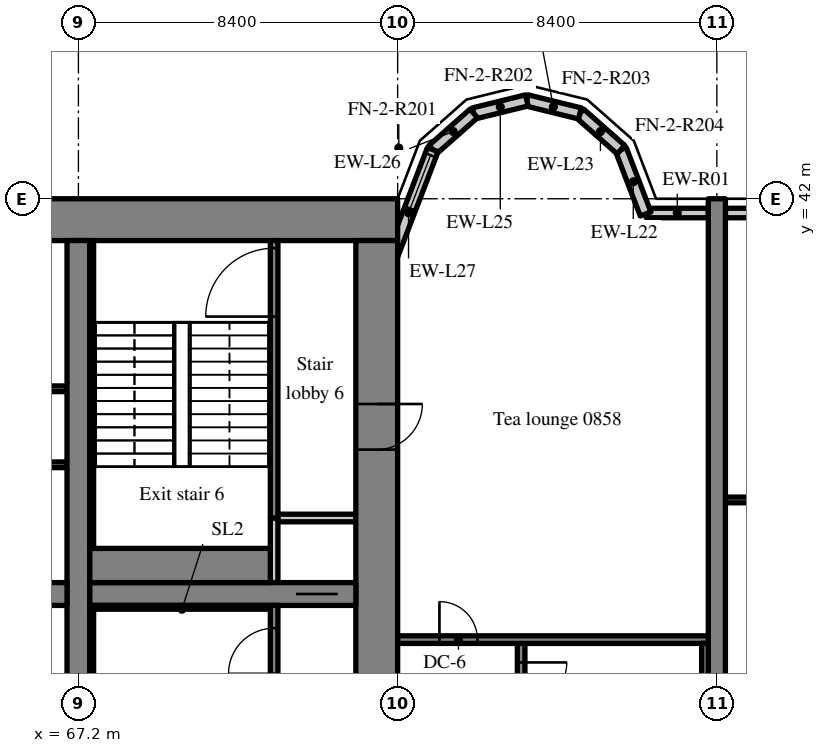
"""IFC4 building model, lengths in metres.
Left out: names, types, materials, properties, quantities, classifications, styles, units other than length and angle.
Written with IfcOpenShell. Run it as: python <this file> out.ifc"""

import sys

from ifc_helpers import new_model, si_unit, direction, frame, frame_2d, origin, place, context, subcontext, project, spatial, rectangle, extrude, source, transform, mapped, element, fill, save


model = new_model("IFC4")
c1 = context("Model", 3, precision=1e-05, world=origin(), true_north=direction((0.0, 1.0)))
c2 = subcontext(c1, "Body", "Model", "MODEL_VIEW")
j1 = project(units=[si_unit("LENGTHUNIT", "METRE"), si_unit("PLANEANGLEUNIT", "RADIAN")], contexts=[c1])
p1 = place(None, origin())
s1 = spatial("IfcSite", under=j1, at=p1, CompositionType="ELEMENT")
p2 = place(p1, origin())
s2 = spatial("IfcBuilding", under=s1, at=p2, CompositionType="ELEMENT")
p3 = place(p2, frame((0.0, 0.0, 39.2)))
s3 = spatial("IfcBuildingStorey", under=s2, at=p3, CompositionType="ELEMENT", Elevation=39.2)
m1 = source(origin(), c2, "Body", "SweptSolid", [
    extrude(rectangle(XDim=50.4, YDim=1.1, at=frame_2d((25.2, 0.0))), origin(), (0.0, 0.0, 1.0), 3.52),
])
p4 = place(p3, frame((25.2, 41.45, 0.0), z_axis=(0.0, 0.0, 1.0), x_axis=(1.0, 0.0, 0.0)))
e1 = element("IfcWall", 1, at=p4, inside=s3, PredefinedType="SHEAR", context=c2, shape_type="MappedRepresentation", body=[
    mapped(m1, transform((0.0, 0.0, 0.0), scale=1.0)),
])
m2 = source(origin(), c2, "Body", "SweptSolid", [
    extrude(rectangle(XDim=17.8, YDim=1.1, at=frame_2d((8.9, 0.0))), origin(), (0.0, 0.0, 1.0), 3.52),
])
p5 = place(p3, frame((75.05, 23.1, 0.0), z_axis=(0.0, 0.0, 1.0), x_axis=(0.0, 1.0, 0.0)))
e2 = element("IfcWall", 2, at=p5, inside=s3, PredefinedType="SHEAR", context=c2, shape_type="MappedRepresentation", body=[
    mapped(m2, transform((0.0, 0.0, 0.0), scale=1.0)),
])
m3 = source(origin(), c2, "Body", "SweptSolid", [
    extrude(rectangle(XDim=1.2, YDim=2.1, at=frame_2d((0.6, 1.05))), frame((0.0, 0.56, 0.0), z_axis=(0.0, -1.0, 0.0), x_axis=(1.0, 0.0, 0.0)), (0.0, 0.0, 1.0), 1.12),
])
p6 = place(p5, frame((12.3, 0.0, 0.0)))
e3 = element("IfcOpeningElement", 3, at=p6, cuts=e2, PredefinedType="OPENING", context=c2, shape_type="MappedRepresentation", body=[
    mapped(m3, transform((0.0, 0.0, 0.0), scale=1.0)),
])
m4 = source(origin(), c2, "Body", "SweptSolid", [
    extrude(rectangle(XDim=17.8, YDim=0.6, at=frame_2d((8.9, 0.0))), origin(), (0.0, 0.0, 1.0), 3.52),
])
p7 = place(p3, frame((67.2, 23.1, 0.0), z_axis=(0.0, 0.0, 1.0), x_axis=(0.0, 1.0, 0.0)))
e4 = element("IfcWall", 4, at=p7, inside=s3, PredefinedType="SHEAR", context=c2, shape_type="MappedRepresentation", body=[
    mapped(m4, transform((0.0, 0.0, 0.0), scale=1.0)),
])
m5 = source(origin(), c2, "Body", "SweptSolid", [
    extrude(rectangle(XDim=16.2, YDim=0.6, at=frame_2d((8.1, 0.0))), origin(), (0.0, 0.0, 1.0), 3.52),
])
p8 = place(p3, frame((50.7, 31.6, 0.0), z_axis=(0.0, 0.0, 1.0), x_axis=(1.0, 0.0, 0.0)))
e5 = element("IfcWall", 5, at=p8, inside=s3, PredefinedType="SHEAR", context=c2, shape_type="MappedRepresentation", body=[
    mapped(m5, transform((0.0, 0.0, 0.0), scale=1.0)),
])
m6 = source(origin(), c2, "Body", "SweptSolid", [
    extrude(rectangle(XDim=1.0, YDim=2.1, at=frame_2d((0.5, 1.05))), frame((0.0, 0.31, 0.0), z_axis=(0.0, -1.0, 0.0), x_axis=(1.0, 0.0, 0.0)), (0.0, 0.0, 1.0), 0.62),
])
p9 = place(p8, frame((0.55, 0.0, 0.0)))
e6 = element("IfcOpeningElement", 6, at=p9, cuts=e5, PredefinedType="OPENING", context=c2, shape_type="MappedRepresentation", body=[
    mapped(m6, transform((0.0, 0.0, 0.0), scale=1.0)),
])
m7 = source(origin(), c2, "Body", "SweptSolid", [
    extrude(rectangle(XDim=7.0, YDim=0.6, at=frame_2d((3.5, 0.0))), origin(), (0.0, 0.0, 1.0), 3.52),
])
p10 = place(p3, frame((67.5, 31.6, 0.0), z_axis=(0.0, 0.0, 1.0), x_axis=(1.0, 0.0, 0.0)))
e7 = element("IfcWall", 7, at=p10, inside=s3, PredefinedType="SHEAR", context=c2, shape_type="MappedRepresentation", body=[
    mapped(m7, transform((0.0, 0.0, 0.0), scale=1.0)),
])
m8 = source(origin(), c2, "Body", "SweptSolid", [
    extrude(rectangle(XDim=1.1, YDim=2.1, at=frame_2d((0.55, 1.05))), frame((0.0, 0.31, 0.0), z_axis=(0.0, -1.0, 0.0), x_axis=(1.0, 0.0, 0.0)), (0.0, 0.0, 1.0), 0.62),
])
p11 = place(p10, frame((5.425, 0.0, 0.0)))
e8 = element("IfcOpeningElement", 8, at=p11, cuts=e7, PredefinedType="OPENING", context=c2, shape_type="MappedRepresentation", body=[
    mapped(m8, transform((0.0, 0.0, 0.0), scale=1.0)),
])
m9 = source(origin(), c2, "Body", "SweptSolid", [
    extrude(rectangle(XDim=20.0, YDim=0.45, at=frame_2d((10.0, 0.0))), origin(), (0.0, 0.0, 1.0), 3.52),
])
p12 = place(p3, frame((84.0, 22.0, 0.0), z_axis=(0.0, 0.0, 1.0), x_axis=(0.0, 1.0, 0.0)))
e9 = element("IfcWall", 9, at=p12, inside=s3, PredefinedType="SHEAR", context=c2, shape_type="MappedRepresentation", body=[
    mapped(m9, transform((0.0, 0.0, 0.0), scale=1.0)),
])
m10 = source(origin(), c2, "Body", "SweptSolid", [
    extrude(rectangle(XDim=1.633, YDim=0.25, at=frame_2d((0.816, 0.0))), origin(), (0.0, 0.0, 1.0), 2.77),
])
p13 = place(p3, frame((83.775, 41.625, 0.0), z_axis=(0.0, 0.0, 1.0), x_axis=(-1.0, 0.0, 0.0)))
e10 = element("IfcWall", 10, at=p13, inside=s3, PredefinedType="SOLIDWALL", context=c2, shape_type="MappedRepresentation", body=[
    mapped(m10, transform((0.0, 0.0, 0.0), scale=1.0)),
])
m11 = source(origin(), c2, "Body", "SweptSolid", [
    extrude(rectangle(XDim=3.525, YDim=0.25, at=frame_2d((1.762, 0.0))), origin(), (0.0, 0.0, 1.0), 2.77),
])
p14 = place(p3, frame((87.75, 41.625, 0.0), z_axis=(0.0, 0.0, 1.0), x_axis=(-1.0, 0.0, 0.0)))
e11 = element("IfcWall", 11, at=p14, inside=s3, PredefinedType="SOLIDWALL", context=c2, shape_type="MappedRepresentation", body=[
    mapped(m11, transform((0.0, 0.0, 0.0), scale=1.0)),
])
m12 = source(origin(), c2, "Body", "SweptSolid", [
    extrude(rectangle(XDim=1.5, YDim=1.5, at=frame_2d((0.75, 0.75))), frame((0.0, 0.135, 0.0), z_axis=(0.0, -1.0, 0.0), x_axis=(1.0, 0.0, 0.0)), (0.0, 0.0, 1.0), 0.27),
])
p15 = place(p14, frame((1.012, 0.0, 0.9)))
e12 = element("IfcOpeningElement", 12, at=p15, cuts=e11, PredefinedType="OPENING", context=c2, shape_type="MappedRepresentation", body=[
    mapped(m12, transform((0.0, 0.0, 0.0), scale=1.0)),
])
m13 = source(origin(), c2, "Body", "SweptSolid", [
    extrude(rectangle(XDim=1.812, YDim=0.3, at=frame_2d((0.906, 0.0))), origin(), (0.0, 0.0, 1.0), 3.52),
])
p16 = place(p3, frame((82.125, 41.6, 0.0), z_axis=(0.0, 0.0, 1.0), x_axis=(-0.357877270961, 0.93376863244, 0.0)))
e13 = element("IfcWall", 13, at=p16, inside=s3, PredefinedType="SOLIDWALL", context=c2, shape_type="MappedRepresentation", body=[
    mapped(m13, transform((0.0, 0.0, 0.0), scale=1.0)),
])
m14 = source(origin(), c2, "Body", "SweptSolid", [
    extrude(rectangle(XDim=1.44, YDim=0.3, at=frame_2d((0.72, 0.0))), origin(), (0.0, 0.0, 1.0), 3.52),
])
p17 = place(p3, frame((81.477, 43.292, 0.0), z_axis=(0.0, 0.0, 1.0), x_axis=(-0.74957555648, 0.661918790432, 0.0)))
e14 = element("IfcWall", 14, at=p17, inside=s3, PredefinedType="SOLIDWALL", context=c2, shape_type="MappedRepresentation", body=[
    mapped(m14, transform((0.0, 0.0, 0.0), scale=1.0)),
])
m15 = source(origin(), c2, "Body", "SweptSolid", [
    extrude(rectangle(XDim=1.439, YDim=0.3, at=frame_2d((0.719, 0.0))), origin(), (0.0, 0.0, 1.0), 3.52),
])
for number, where, z_axis, x_axis in (
    (15, (80.397, 44.245, 0.0), (0.0, 0.0, 1.0), (-0.971, 0.238, 0.0)),
    (16, (79.0, 44.588, 0.0), (0.0, 0.0, 1.0), (-0.971, -0.238, 0.0)),
):
    element("IfcWall", number, at=place(p3, frame(where, z_axis=z_axis, x_axis=x_axis)), inside=s3, PredefinedType="SOLIDWALL", context=c2, shape_type="MappedRepresentation", body=[
        mapped(m15, transform((0.0, 0.0, 0.0), scale=1.0)),
    ])
p18 = place(p3, frame((77.603, 44.245, 0.0), z_axis=(0.0, 0.0, 1.0), x_axis=(-0.74957555648, -0.661918790432, 0.0)))
e17 = element("IfcWall", 17, at=p18, inside=s3, PredefinedType="SOLIDWALL", context=c2, shape_type="MappedRepresentation", body=[
    mapped(m14, transform((0.0, 0.0, 0.0), scale=1.0)),
])
m16 = source(origin(), c2, "Body", "SweptSolid", [
    extrude(rectangle(XDim=3.559, YDim=0.3, at=frame_2d((1.78, 0.0))), origin(), (0.0, 0.0, 1.0), 3.52),
])
p19 = place(p3, frame((76.523, 43.292, 0.0), z_axis=(0.0, 0.0, 1.0), x_axis=(-0.35779745313, -0.933799219604, 0.0)))
e18 = element("IfcWall", 18, at=p19, inside=s3, PredefinedType="SOLIDWALL", context=c2, shape_type="MappedRepresentation", body=[
    mapped(m16, transform((0.0, 0.0, 0.0), scale=1.0)),
])
m17 = source(origin(), c2, "Body", "SweptSolid", [
    extrude(rectangle(XDim=1.5, YDim=2.0, at=frame_2d((0.75, 1.0))), frame((0.0, 0.16, 0.0), z_axis=(0.0, -1.0, 0.0), x_axis=(1.0, 0.0, 0.0)), (0.0, 0.0, 1.0), 0.32),
])
p20 = place(p19, frame((0.156, 0.0, 0.9)))
e19 = element("IfcOpeningElement", 19, at=p20, cuts=e18, PredefinedType="OPENING", context=c2, shape_type="MappedRepresentation", body=[
    mapped(m17, transform((0.0, 0.0, 0.0), scale=1.0)),
])
m18 = source(origin(), c2, "Body", "SweptSolid", [
    extrude(rectangle(XDim=14.1, YDim=0.15, at=frame_2d((7.05, 0.0))), origin(), (0.0, 0.0, 1.0), 3.52),
])
p21 = place(p3, frame((66.9, 35.0, 0.0), z_axis=(0.0, 0.0, 1.0), x_axis=(-1.0, 0.0, 0.0)))
e20 = element("IfcWall", 20, at=p21, inside=s3, PredefinedType="PARTITIONING", context=c2, shape_type="MappedRepresentation", body=[
    mapped(m18, transform((0.0, 0.0, 0.0), scale=1.0)),
])
m19 = source(origin(), c2, "Body", "SweptSolid", [
    extrude(rectangle(XDim=0.9, YDim=2.1, at=frame_2d((0.45, 1.05))), frame((0.0, 0.085, 0.0), z_axis=(0.0, -1.0, 0.0), x_axis=(1.0, 0.0, 0.0)), (0.0, 0.0, 1.0), 0.17),
])
p22 = place(p21, frame((2.004, 0.0, 0.0)))
e21 = element("IfcOpeningElement", 21, at=p22, cuts=e20, PredefinedType="OPENING", context=c2, shape_type="MappedRepresentation", body=[
    mapped(m19, transform((0.0, 0.0, 0.0), scale=1.0)),
])
p23 = place(p21, frame((9.017, 0.0, 0.0)))
e22 = element("IfcOpeningElement", 22, at=p23, cuts=e20, PredefinedType="OPENING", context=c2, shape_type="MappedRepresentation", body=[
    mapped(m19, transform((0.0, 0.0, 0.0), scale=1.0)),
])
m20 = source(origin(), c2, "Body", "SweptSolid", [
    extrude(rectangle(XDim=16.2, YDim=0.15, at=frame_2d((8.1, 0.0))), origin(), (0.0, 0.0, 1.0), 3.52),
])
p24 = place(p3, frame((66.9, 37.0, 0.0), z_axis=(0.0, 0.0, 1.0), x_axis=(-1.0, 0.0, 0.0)))
e23 = element("IfcWall", 23, at=p24, inside=s3, PredefinedType="PARTITIONING", context=c2, shape_type="MappedRepresentation", body=[
    mapped(m20, transform((0.0, 0.0, 0.0), scale=1.0)),
])
p25 = place(p24, frame((1.575, 0.0, 0.0)))
e24 = element("IfcOpeningElement", 24, at=p25, cuts=e23, PredefinedType="OPENING", context=c2, shape_type="MappedRepresentation", body=[
    mapped(m19, transform((0.0, 0.0, 0.0), scale=1.0)),
])
p26 = place(p24, frame((7.245, 0.0, 0.0)))
e25 = element("IfcOpeningElement", 25, at=p26, cuts=e23, PredefinedType="OPENING", context=c2, shape_type="MappedRepresentation", body=[
    mapped(m19, transform((0.0, 0.0, 0.0), scale=1.0)),
])
p27 = place(p24, frame((12.105, 0.0, 0.0)))
e26 = element("IfcOpeningElement", 26, at=p27, cuts=e23, PredefinedType="OPENING", context=c2, shape_type="MappedRepresentation", body=[
    mapped(m19, transform((0.0, 0.0, 0.0), scale=1.0)),
])
p28 = place(p24, frame((14.535, 0.0, 0.0)))
e27 = element("IfcOpeningElement", 27, at=p28, cuts=e23, PredefinedType="OPENING", context=c2, shape_type="MappedRepresentation", body=[
    mapped(m19, transform((0.0, 0.0, 0.0), scale=1.0)),
])
m21 = source(origin(), c2, "Body", "SweptSolid", [
    extrude(rectangle(XDim=8.2, YDim=0.2, at=frame_2d((4.1, 0.0))), origin(), (0.0, 0.0, 1.0), 3.52),
])
p29 = place(p3, frame((72.35, 23.1, 0.0), z_axis=(0.0, 0.0, 1.0), x_axis=(0.0, 1.0, 0.0)))
e28 = element("IfcWall", 28, at=p29, inside=s3, PredefinedType="SOLIDWALL", context=c2, shape_type="MappedRepresentation", body=[
    mapped(m21, transform((0.0, 0.0, 0.0), scale=1.0)),
])
m22 = source(origin(), c2, "Body", "SweptSolid", [
    extrude(rectangle(XDim=1.2, YDim=2.1, at=frame_2d((0.6, 1.05))), frame((0.0, 0.11, 0.0), z_axis=(0.0, -1.0, 0.0), x_axis=(1.0, 0.0, 0.0)), (0.0, 0.0, 1.0), 0.22),
])
p30 = place(p29, frame((6.4, 0.0, 0.0)))
e29 = element("IfcOpeningElement", 29, at=p30, cuts=e28, PredefinedType="OPENING", context=c2, shape_type="MappedRepresentation", body=[
    mapped(m22, transform((0.0, 0.0, 0.0), scale=1.0)),
])
m23 = source(origin(), c2, "Body", "SweptSolid", [
    extrude(rectangle(XDim=1.7, YDim=0.2, at=frame_2d((0.85, 0.0))), origin(), (0.0, 0.0, 1.0), 3.52),
])
p31 = place(p3, frame((72.35, 31.9, 0.0), z_axis=(0.0, 0.0, 1.0), x_axis=(0.0, 1.0, 0.0)))
e30 = element("IfcWall", 30, at=p31, inside=s3, PredefinedType="SOLIDWALL", context=c2, shape_type="MappedRepresentation", body=[
    mapped(m23, transform((0.0, 0.0, 0.0), scale=1.0)),
])
m24 = source(origin(), c2, "Body", "SweptSolid", [
    extrude(rectangle(XDim=2.05, YDim=0.2, at=frame_2d((1.025, 0.0))), origin(), (0.0, 0.0, 1.0), 3.52),
])
p32 = place(p3, frame((72.45, 33.6, 0.0), z_axis=(0.0, 0.0, 1.0), x_axis=(1.0, 0.0, 0.0)))
e31 = element("IfcWall", 31, at=p32, inside=s3, PredefinedType="SOLIDWALL", context=c2, shape_type="MappedRepresentation", body=[
    mapped(m24, transform((0.0, 0.0, 0.0), scale=1.0)),
])
m25 = source(origin(), c2, "Body", "SweptSolid", [
    extrude(rectangle(XDim=7.3, YDim=0.2, at=frame_2d((3.65, 0.0))), origin(), (0.0, 0.0, 1.0), 3.52),
])
p33 = place(p3, frame((72.35, 33.6, 0.0), z_axis=(0.0, 0.0, 1.0), x_axis=(0.0, 1.0, 0.0)))
e32 = element("IfcWall", 32, at=p33, inside=s3, PredefinedType="SOLIDWALL", context=c2, shape_type="MappedRepresentation", body=[
    mapped(m25, transform((0.0, 0.0, 0.0), scale=1.0)),
])
m26 = source(origin(), c2, "Body", "SweptSolid", [
    extrude(rectangle(XDim=1.8, YDim=2.1, at=frame_2d((0.9, 1.05))), frame((0.0, 0.11, 0.0), z_axis=(0.0, -1.0, 0.0), x_axis=(1.0, 0.0, 0.0)), (0.0, 0.0, 1.0), 0.22),
])
p34 = place(p33, frame((5.3, 0.0, 0.0)))
e33 = element("IfcOpeningElement", 33, at=p34, cuts=e32, PredefinedType="OPENING", context=c2, shape_type="MappedRepresentation", body=[
    mapped(m26, transform((0.0, 0.0, 0.0), scale=1.0)),
])
m27 = source(origin(), c2, "Body", "SweptSolid", [
    extrude(rectangle(XDim=8.3, YDim=0.2, at=frame_2d((4.15, 0.0))), origin(), (0.0, 0.0, 1.0), 3.52),
])
p35 = place(p3, frame((78.85, 22.1, 0.0), z_axis=(0.0, 0.0, 1.0), x_axis=(0.0, 1.0, 0.0)))
e34 = element("IfcWall", 34, at=p35, inside=s3, PredefinedType="SOLIDWALL", context=c2, shape_type="MappedRepresentation", body=[
    mapped(m27, transform((0.0, 0.0, 0.0), scale=1.0)),
])
p36 = place(p35, frame((6.5, 0.0, 0.0)))
e35 = element("IfcOpeningElement", 35, at=p36, cuts=e34, PredefinedType="OPENING", context=c2, shape_type="MappedRepresentation", body=[
    mapped(m22, transform((0.0, 0.0, 0.0), scale=1.0)),
])
m28 = source(origin(), c2, "Body", "SweptSolid", [
    extrude(rectangle(XDim=8.175, YDim=0.2, at=frame_2d((4.087, 0.0))), origin(), (0.0, 0.0, 1.0), 3.52),
])
p37 = place(p3, frame((83.775, 30.4, 0.0), z_axis=(0.0, 0.0, 1.0), x_axis=(-1.0, 0.0, 0.0)))
e36 = element("IfcWall", 36, at=p37, inside=s3, PredefinedType="SOLIDWALL", context=c2, shape_type="MappedRepresentation", body=[
    mapped(m28, transform((0.0, 0.0, 0.0), scale=1.0)),
])
m29 = source(origin(), c2, "Body", "SweptSolid", [
    extrude(rectangle(XDim=1.0, YDim=2.1, at=frame_2d((0.5, 1.05))), frame((0.0, 0.11, 0.0), z_axis=(0.0, -1.0, 0.0), x_axis=(1.0, 0.0, 0.0)), (0.0, 0.0, 1.0), 0.22),
])
p38 = place(p37, frame((6.075, 0.0, 0.0)))
e37 = element("IfcOpeningElement", 37, at=p38, cuts=e36, PredefinedType="OPENING", context=c2, shape_type="MappedRepresentation", body=[
    mapped(m29, transform((0.0, 0.0, 0.0), scale=1.0)),
])
m30 = source(origin(), c2, "Body", "SweptSolid", [
    extrude(rectangle(XDim=4.75, YDim=0.1, at=frame_2d((2.375, 0.0))), origin(), (0.0, 0.0, 1.0), 3.52),
])
p39 = place(p3, frame((67.5, 31.25, 0.0), z_axis=(0.0, 0.0, 1.0), x_axis=(1.0, 0.0, 0.0)))
e38 = element("IfcWall", 38, at=p39, inside=s3, PredefinedType="SOLIDWALL", context=c2, shape_type="MappedRepresentation", body=[
    mapped(m30, transform((0.0, 0.0, 0.0), scale=1.0)),
])
m31 = source(origin(), c2, "Body", "SweptSolid", [
    extrude(rectangle(XDim=8.1, YDim=0.1, at=frame_2d((4.05, 0.0))), origin(), (0.0, 0.0, 1.0), 3.52),
])
p40 = place(p3, frame((67.55, 23.1, 0.0), z_axis=(0.0, 0.0, 1.0), x_axis=(0.0, 1.0, 0.0)))
e39 = element("IfcWall", 39, at=p40, inside=s3, PredefinedType="SOLIDWALL", context=c2, shape_type="MappedRepresentation", body=[
    mapped(m31, transform((0.0, 0.0, 0.0), scale=1.0)),
])
m32 = source(origin(), c2, "Body", "SweptSolid", [
    extrude(rectangle(XDim=4.75, YDim=0.9, at=frame_2d((2.375, 0.0))), origin(), (0.0, 0.0, 1.0), 3.52),
])
p41 = place(p3, frame((67.5, 32.35, 0.0), z_axis=(0.0, 0.0, 1.0), x_axis=(1.0, 0.0, 0.0)))
e40 = element("IfcWall", 40, at=p41, inside=s3, PredefinedType="SOLIDWALL", context=c2, shape_type="MappedRepresentation", body=[
    mapped(m32, transform((0.0, 0.0, 0.0), scale=1.0)),
])
p42 = place(p3, frame((67.55, 32.8, 0.0), z_axis=(0.0, 0.0, 1.0), x_axis=(0.0, 1.0, 0.0)))
e41 = element("IfcWall", 41, at=p42, inside=s3, PredefinedType="SOLIDWALL", context=c2, shape_type="MappedRepresentation", body=[
    mapped(m31, transform((0.0, 0.0, 0.0), scale=1.0)),
])
m33 = source(origin(), c2, "Body", "SweptSolid", [
    extrude(rectangle(XDim=8.1, YDim=0.175, at=frame_2d((4.05, 0.0))), origin(), (0.0, 0.0, 1.0), 3.52),
])
p43 = place(p3, frame((83.688, 22.2, 0.0), z_axis=(0.0, 0.0, 1.0), x_axis=(0.0, 1.0, 0.0)))
e42 = element("IfcWall", 42, at=p43, inside=s3, PredefinedType="SOLIDWALL", context=c2, shape_type="MappedRepresentation", body=[
    mapped(m33, transform((0.0, 0.0, 0.0), scale=1.0)),
])
m34 = source(origin(), c2, "Body", "SweptSolid", [
    extrude(rectangle(XDim=7.95, YDim=0.15, at=frame_2d((3.975, 0.0))), origin(), (0.0, 0.0, 1.0), 3.52),
])
p44 = place(p3, frame((84.225, 34.075, 0.0), z_axis=(0.0, 0.0, 1.0), x_axis=(1.0, 0.0, 0.0)))
e43 = element("IfcWall", 43, at=p44, inside=s3, PredefinedType="PARTITIONING", context=c2, shape_type="MappedRepresentation", body=[
    mapped(m34, transform((0.0, 0.0, 0.0), scale=1.0)),
])
m35 = source(origin(), c2, "Body", "SweptSolid", [
    extrude(rectangle(XDim=1.0, YDim=2.1, at=frame_2d((0.5, 1.05))), frame((0.0, 0.085, 0.0), z_axis=(0.0, -1.0, 0.0), x_axis=(1.0, 0.0, 0.0)), (0.0, 0.0, 1.0), 0.17),
])
p45 = place(p44, frame((0.7, 0.0, 0.0)))
e44 = element("IfcOpeningElement", 44, at=p45, cuts=e43, PredefinedType="OPENING", context=c2, shape_type="MappedRepresentation", body=[
    mapped(m35, transform((0.0, 0.0, 0.0), scale=1.0)),
])
m36 = source(origin(), c2, "Body", "SweptSolid", [
    extrude(rectangle(XDim=1.5, YDim=2.0, at=frame_2d((0.75, 1.0))), frame((0.0, 0.03, 0.0), z_axis=(0.0, -1.0, 0.0), x_axis=(1.0, 0.0, 0.0)), (0.0, 0.0, 1.0), 0.06),
])
p46 = place(p20, origin())
e45 = element("IfcWindow", 45, at=p46, inside=s3, PartitioningType="SINGLE_PANEL", PredefinedType="WINDOW", context=c2, shape_type="MappedRepresentation", body=[
    mapped(m36, transform((0.0, 0.0, 0.0), scale=1.0)),
])
fill(e19, e45)
m37 = source(origin(), c2, "Body", "SweptSolid", [
    extrude(rectangle(XDim=1.2, YDim=2.1, at=frame_2d((0.6, 1.05))), frame((0.0, 0.025, 0.0), z_axis=(0.0, -1.0, 0.0), x_axis=(1.0, 0.0, 0.0)), (0.0, 0.0, 1.0), 0.05),
])
p47 = place(p30, origin())
e46 = element("IfcDoor", 46, at=p47, inside=s3, OperationType="SINGLE_SWING_LEFT", PredefinedType="DOOR", context=c2, shape_type="MappedRepresentation", body=[
    mapped(m37, transform((0.0, 0.0, 0.0), scale=1.0)),
])
fill(e29, e46)
m38 = source(origin(), c2, "Body", "SweptSolid", [
    extrude(rectangle(XDim=1.1, YDim=2.1, at=frame_2d((0.55, 1.05))), frame((0.0, 0.025, 0.0), z_axis=(0.0, -1.0, 0.0), x_axis=(1.0, 0.0, 0.0)), (0.0, 0.0, 1.0), 0.05),
])
p48 = place(p11, origin())
e47 = element("IfcDoor", 47, at=p48, inside=s3, OperationType="SLIDING_TO_RIGHT", PredefinedType="DOOR", context=c2, shape_type="MappedRepresentation", body=[
    mapped(m38, transform((0.0, 0.0, 0.0), scale=1.0)),
])
fill(e8, e47)
m39 = source(origin(), c2, "Body", "SweptSolid", [
    extrude(rectangle(XDim=1.8, YDim=2.1, at=frame_2d((0.9, 1.05))), frame((0.0, 0.025, 0.0), z_axis=(0.0, -1.0, 0.0), x_axis=(1.0, 0.0, 0.0)), (0.0, 0.0, 1.0), 0.05),
])
p49 = place(p34, origin())
e48 = element("IfcDoor", 48, at=p49, inside=s3, OperationType="SINGLE_SWING_LEFT", PredefinedType="DOOR", context=c2, shape_type="MappedRepresentation", body=[
    mapped(m39, transform((0.0, 0.0, 0.0), scale=1.0)),
])
fill(e33, e48)
p50 = place(p6, origin())
e49 = element("IfcDoor", 49, at=p50, inside=s3, OperationType="SINGLE_SWING_RIGHT", PredefinedType="DOOR", context=c2, shape_type="MappedRepresentation", body=[
    mapped(m37, transform((0.0, 0.0, 0.0), scale=1.0)),
])
fill(e3, e49)
p51 = place(p36, origin())
e50 = element("IfcDoor", 50, at=p51, inside=s3, OperationType="SINGLE_SWING_RIGHT", PredefinedType="DOOR", context=c2, shape_type="MappedRepresentation", body=[
    mapped(m37, transform((0.0, 0.0, 0.0), scale=1.0)),
])
fill(e35, e50)
m40 = source(origin(), c2, "Body", "SweptSolid", [
    extrude(rectangle(XDim=1.0, YDim=2.1, at=frame_2d((0.5, 1.05))), frame((0.0, 0.025, 0.0), z_axis=(0.0, -1.0, 0.0), x_axis=(1.0, 0.0, 0.0)), (0.0, 0.0, 1.0), 0.05),
])
p52 = place(p38, origin())
e51 = element("IfcDoor", 51, at=p52, inside=s3, OperationType="SINGLE_SWING_RIGHT", PredefinedType="DOOR", context=c2, shape_type="MappedRepresentation", body=[
    mapped(m40, transform((0.0, 0.0, 0.0), scale=1.0)),
])
fill(e37, e51)
save(model, sys.argv[1])
